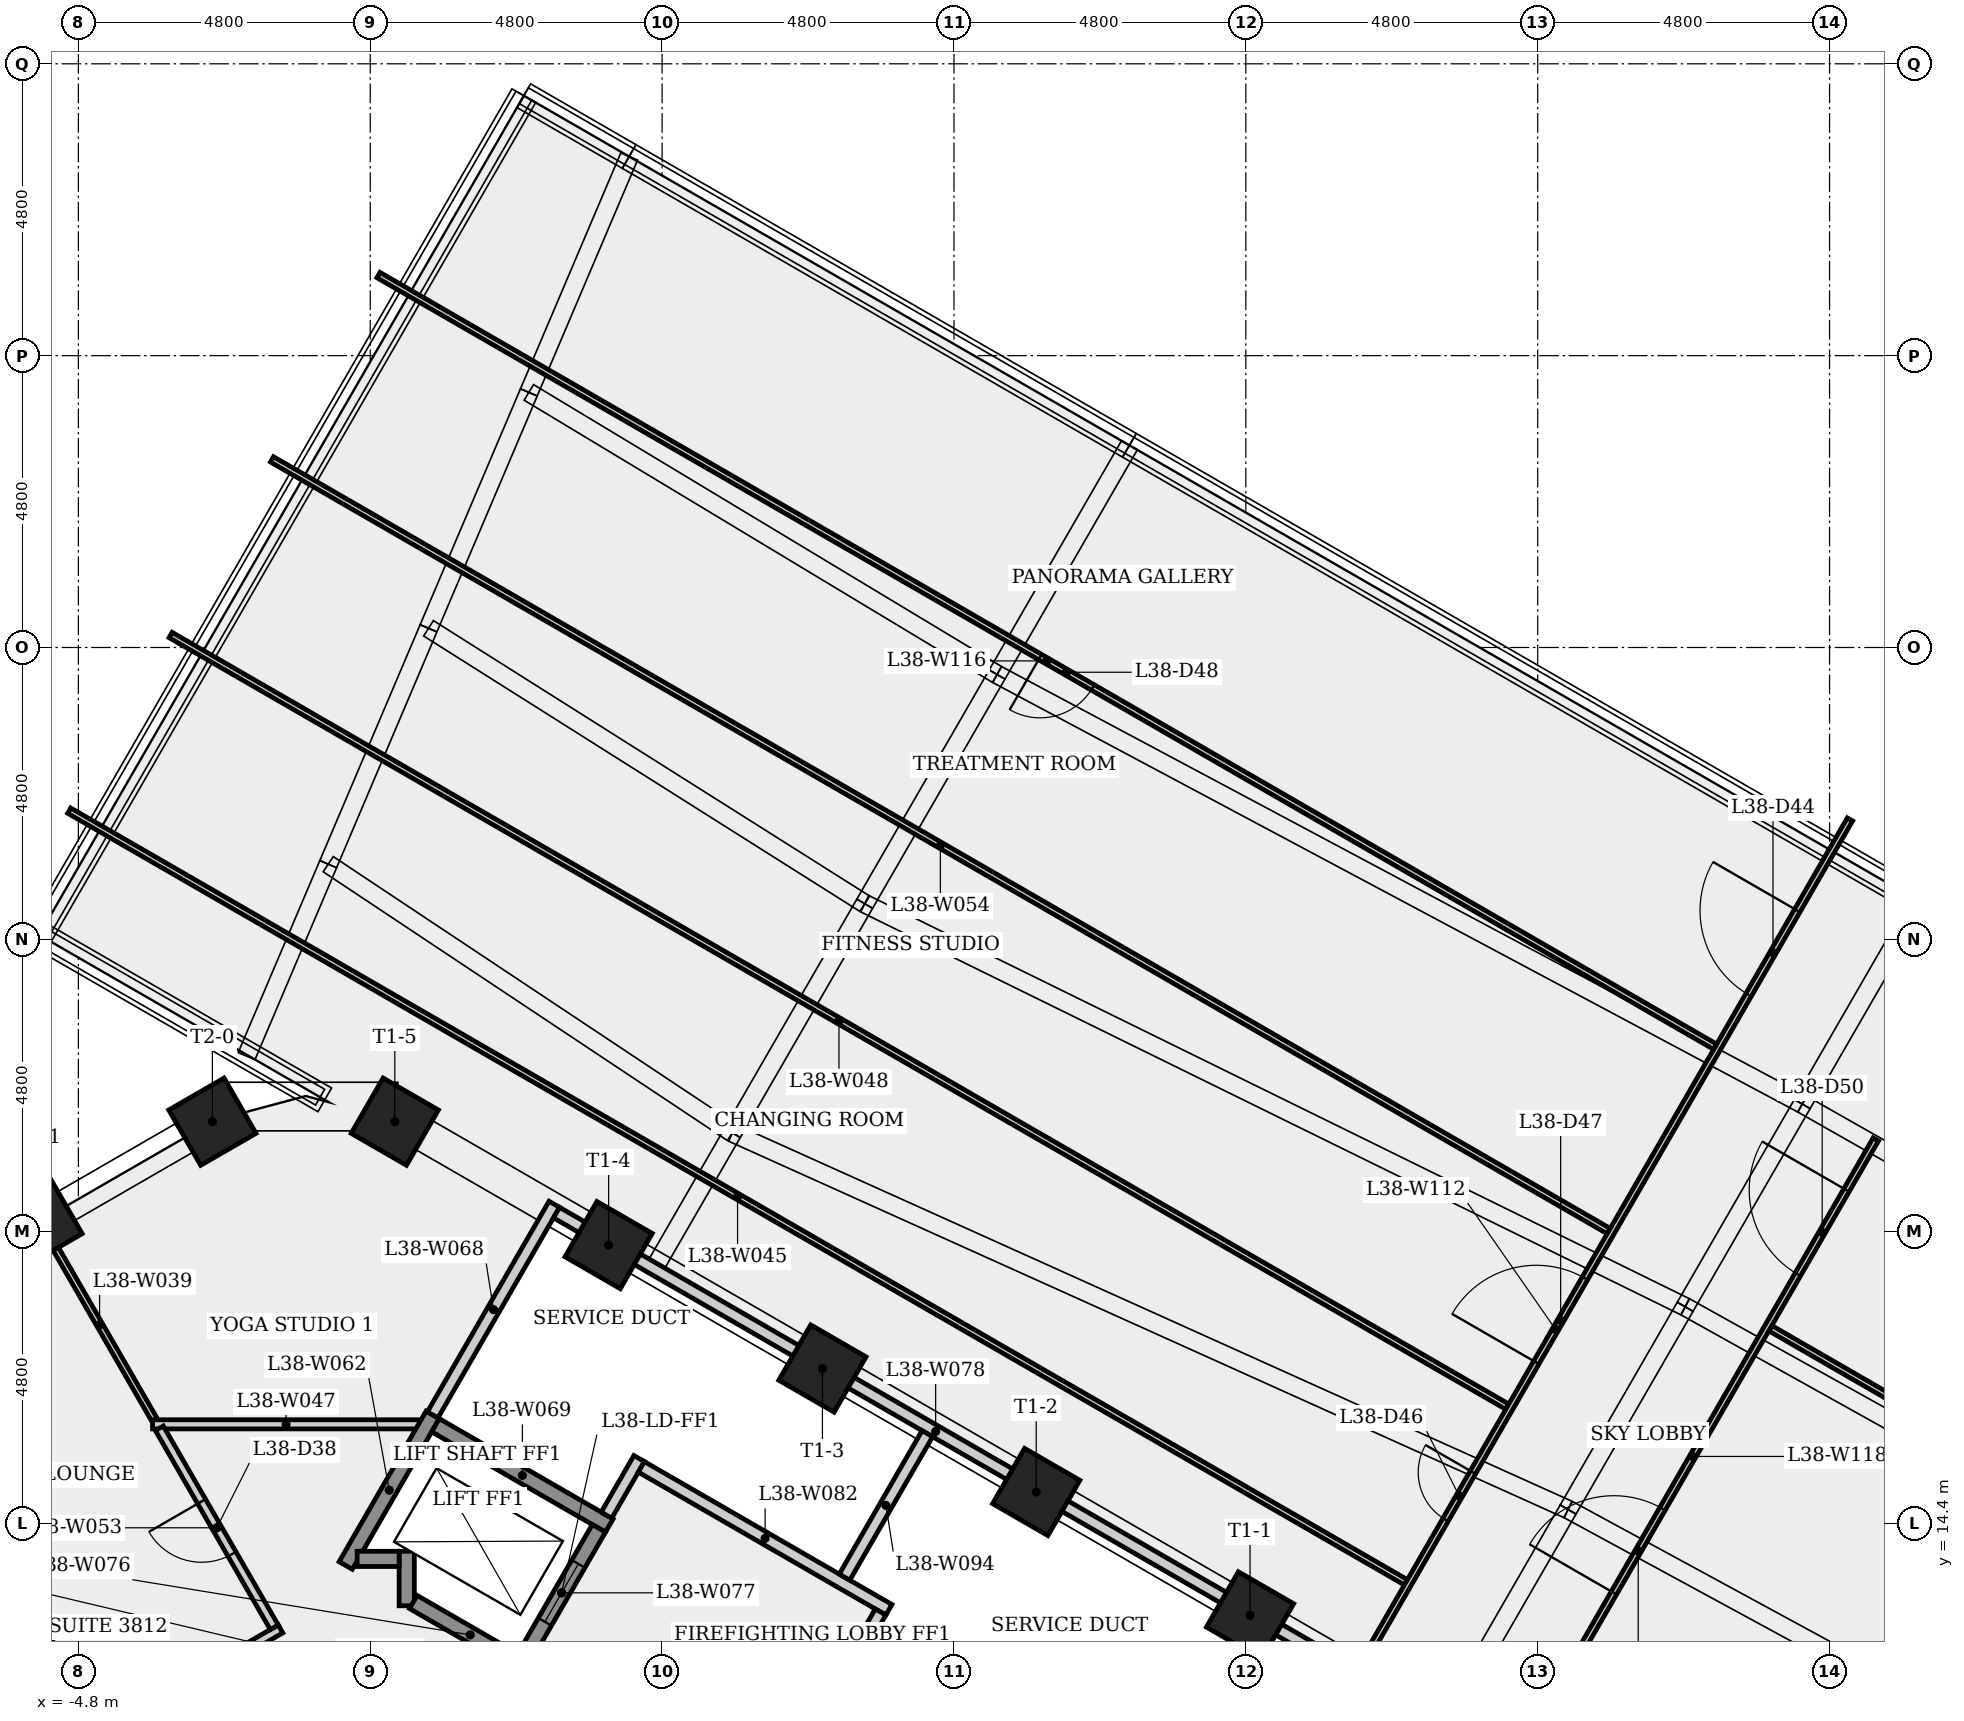
"""IFC4 building model, lengths in metres.
Left out: names, types, materials, properties, quantities, classifications, styles, units other than length and angle.
Written with IfcOpenShell. Run it as: python <this file> out.ifc"""

import sys

from ifc_helpers import new_model, si_unit, direction, frame, frame_2d, origin, origin_2d, place, context, subcontext, project, spatial, rectangle, extrude, element, fill, save


model = new_model("IFC4")
c1 = context("Model", 3, precision=1e-05, world=origin(), true_north=direction((0.0, 1.0)))
c2 = subcontext(c1, "Body", "Model", "MODEL_VIEW")
j1 = project(units=[si_unit("LENGTHUNIT", "METRE"), si_unit("PLANEANGLEUNIT", "RADIAN")], contexts=[c1])
p1 = place(None, origin())
s1 = spatial("IfcSite", under=j1, at=p1, CompositionType="ELEMENT")
p2 = place(p1, origin())
s2 = spatial("IfcBuilding", under=s1, at=p2, CompositionType="ELEMENT")
p3 = place(p2, frame((0.0, 0.0, 143.9)))
s3 = spatial("IfcBuildingStorey", under=s2, at=p3, CompositionType="ELEMENT", Elevation=143.9)
for number, where, z_axis, x_axis in (
    (1, (14.469, 12.88, 0.0), (0.0, 0.0, 1.0), (0.5, 0.866, 0.0)),
    (2, (10.953, 14.911, 0.0), (0.0, 0.0, 1.0), (0.5, 0.866, 0.0)),
    (3, (7.437, 16.941, 0.0), (0.0, 0.0, 1.0), (0.5, 0.866, 0.0)),
    (4, (3.92, 18.971, 0.0), (0.0, 0.0, 1.0), (0.5, 0.866, 0.0)),
    (5, (0.404, 21.001, 0.0), (0.0, 0.0, 1.0), (0.5, 0.866, 0.0)),
    (6, (-2.596, 21.001, 0.0), (0.0, 0.0, 1.0), (-0.5, 0.866, 0.0)),
    (7, (-5.455, 19.351, 0.0), (0.0, 0.0, 1.0), (-0.5, 0.866, 0.0)),
):
    element("IfcColumn", number, at=place(p3, frame(where, z_axis=z_axis, x_axis=x_axis)), inside=s3, PredefinedType="COLUMN", context=c2, shape_type="SweptSolid", body=[
        extrude(rectangle(XDim=1.05, YDim=1.05, at=origin_2d()), origin(), (0.0, 0.0, 1.0), 4.0),
    ])
p4 = place(p3, frame((-10.094, 7.682, 0.0), z_axis=(0.0, 0.0, 1.0), x_axis=(0.866024204941, 0.500002076452, 0.0)))
e8 = element("IfcWall", 8, at=p4, inside=s3, PredefinedType="PARTITIONING", context=c2, shape_type="SweptSolid", body=[
    extrude(rectangle(XDim=9.951, YDim=0.15, at=frame_2d((4.976, 0.0))), origin(), (0.0, 0.0, 1.0), 3.6),
])
p5 = place(p4, frame((3.642, 0.0, 0.0)))
e9 = element("IfcOpeningElement", 9, at=p5, cuts=e8, PredefinedType="OPENING", context=c2, shape_type="SweptSolid", body=[
    extrude(rectangle(XDim=0.9, YDim=2.1, at=frame_2d((0.45, 1.05))), frame((0.0, 0.085, 0.0), z_axis=(0.0, -1.0, 0.0), x_axis=(1.0, 0.0, 0.0)), (0.0, 0.0, 1.0), 0.17),
])
p6 = place(p3, frame((-5.359, 19.233, 0.0), z_axis=(0.0, 0.0, 1.0), x_axis=(0.499978511878, -0.866037809602, 0.0)))
e10 = element("IfcWall", 10, at=p6, inside=s3, PredefinedType="PARTITIONING", context=c2, shape_type="SweptSolid", body=[
    extrude(rectangle(XDim=3.632, YDim=0.1, at=frame_2d((1.816, 0.0))), origin(), (0.0, 0.0, 1.0), 3.6),
])
p7 = place(p3, frame((-4.451, 11.027, 0.0), z_axis=(0.0, 0.0, 1.0), x_axis=(-0.499983743644, 0.866034789193, 0.0)))
e11 = element("IfcWall", 11, at=p7, inside=s3, PredefinedType="PARTITIONING", context=c2, shape_type="SweptSolid", body=[
    extrude(rectangle(XDim=7.711, YDim=0.1, at=frame_2d((3.855, 0.0))), origin(), (0.0, 0.0, 1.0), 3.6),
])
p8 = place(p3, frame((-4.951, 26.117, 0.0), z_axis=(0.0, 0.0, 1.0), x_axis=(0.866023342268, -0.500003570635, 0.0)))
e12 = element("IfcWall", 12, at=p8, inside=s3, PredefinedType="PARTITIONING", context=c2, shape_type="SweptSolid", body=[
    extrude(rectangle(XDim=25.385, YDim=0.1, at=frame_2d((12.692, 0.0))), origin(), (0.0, 0.0, 1.0), 3.6),
])
p9 = place(p3, frame((-3.581, 16.023, 0.0), z_axis=(0.0, 0.0, 1.0), x_axis=(1.0, 0.0, 0.0)))
e13 = element("IfcWall", 13, at=p9, inside=s3, PredefinedType="PARTITIONING", context=c2, shape_type="SweptSolid", body=[
    extrude(rectangle(XDim=4.393, YDim=0.15, at=frame_2d((2.196, 0.0))), origin(), (0.0, 0.0, 1.0), 3.6),
])
p10 = place(p3, frame((-3.283, 29.005, 0.0), z_axis=(0.0, 0.0, 1.0), x_axis=(0.866023342268, -0.500003570635, 0.0)))
e14 = element("IfcWall", 14, at=p10, inside=s3, PredefinedType="PARTITIONING", context=c2, shape_type="SweptSolid", body=[
    extrude(rectangle(XDim=25.385, YDim=0.1, at=frame_2d((12.692, 0.0))), origin(), (0.0, 0.0, 1.0), 3.6),
])
p11 = place(p3, frame((-1.579, 12.685, 0.0), z_axis=(0.0, 0.0, 1.0), x_axis=(-0.500002049001, 0.86602422079, 0.0)))
e15 = element("IfcWall", 15, at=p11, inside=s3, PredefinedType="PARTITIONING", context=c2, shape_type="SweptSolid", body=[
    extrude(rectangle(XDim=3.779, YDim=0.15, at=frame_2d((1.89, 0.0))), origin(), (0.0, 0.0, 1.0), 3.6),
])
p12 = place(p11, frame((1.39, 0.0, 0.0)))
e16 = element("IfcOpeningElement", 16, at=p12, cuts=e15, PredefinedType="OPENING", context=c2, shape_type="SweptSolid", body=[
    extrude(rectangle(XDim=1.0, YDim=2.1, at=frame_2d((0.5, 1.05))), frame((0.0, 0.085, 0.0), z_axis=(0.0, -1.0, 0.0), x_axis=(1.0, 0.0, 0.0)), (0.0, 0.0, 1.0), 0.17),
])
p13 = place(p3, frame((-1.615, 31.894, 0.0), z_axis=(0.0, 0.0, 1.0), x_axis=(0.866023342268, -0.500003570635, 0.0)))
e17 = element("IfcWall", 17, at=p13, inside=s3, PredefinedType="PARTITIONING", context=c2, shape_type="SweptSolid", body=[
    extrude(rectangle(XDim=25.385, YDim=0.1, at=frame_2d((12.692, 0.0))), origin(), (0.0, 0.0, 1.0), 3.6),
])
p14 = place(p3, frame((-0.403, 13.702, 0.0), z_axis=(0.0, 0.0, 1.0), x_axis=(0.499976111731, 0.866039195244, 0.0)))
e18 = element("IfcWall", 18, at=p14, inside=s3, PredefinedType="SHEAR", context=c2, shape_type="SweptSolid", body=[
    extrude(rectangle(XDim=2.861, YDim=0.25, at=frame_2d((1.43, 0.0))), origin(), (0.0, 0.0, 1.0), 3.6),
])
p15 = place(p3, frame((0.6, 13.039, 0.0), z_axis=(0.0, 0.0, 1.0), x_axis=(0.0, 1.0, 0.0)))
e19 = element("IfcWall", 19, at=p15, inside=s3, PredefinedType="SHEAR", context=c2, shape_type="SweptSolid", body=[
    extrude(rectangle(XDim=0.896, YDim=0.25, at=frame_2d((0.448, 0.0))), origin(), (0.0, 0.0, 1.0), 3.6),
])
p16 = place(p3, frame((0.475, 13.81, 0.0), z_axis=(0.0, 0.0, 1.0), x_axis=(-1.0, 0.0, 0.0)))
e20 = element("IfcWall", 20, at=p16, inside=s3, PredefinedType="SHEAR", context=c2, shape_type="SweptSolid", body=[
    extrude(rectangle(XDim=0.691, YDim=0.25, at=frame_2d((0.345, 0.0))), origin(), (0.0, 0.0, 1.0), 4.0),
])
p17 = place(p3, frame((1.027, 16.179, 0.0), z_axis=(0.0, 0.0, 1.0), x_axis=(0.500006030964, 0.866021921778, 0.0)))
e21 = element("IfcWall", 21, at=p17, inside=s3, PredefinedType="PLUMBINGWALL", context=c2, shape_type="SweptSolid", body=[
    extrude(rectangle(XDim=4.0, YDim=0.2, at=frame_2d((2.0, 0.0))), origin(), (0.0, 0.0, 1.0), 3.6),
])
p18 = place(p3, frame((1.073, 16.008, 0.0), z_axis=(0.0, 0.0, 1.0), x_axis=(0.866040211805, -0.499974350878, 0.0)))
e22 = element("IfcWall", 22, at=p18, inside=s3, PredefinedType="SHEAR", context=c2, shape_type="SweptSolid", body=[
    extrude(rectangle(XDim=3.3, YDim=0.25, at=frame_2d((1.65, 0.0))), origin(), (0.0, 0.0, 1.0), 3.6),
])
p19 = place(p3, frame((2.581, 12.02, 0.0), z_axis=(0.0, 0.0, 1.0), x_axis=(-0.86603892542, 0.499976579108, 0.0)))
e23 = element("IfcWall", 23, at=p19, inside=s3, PredefinedType="SHEAR", context=c2, shape_type="SweptSolid", body=[
    extrude(rectangle(XDim=2.162, YDim=0.25, at=frame_2d((1.081, 0.0))), origin(), (0.0, 0.0, 1.0), 3.6),
])
p20 = place(p3, frame((2.535, 12.191, 0.0), z_axis=(0.0, 0.0, 1.0), x_axis=(0.500061746146, 0.865989751695, 0.0)))
e24 = element("IfcWall", 24, at=p20, inside=s3, PredefinedType="SHEAR", context=c2, shape_type="SweptSolid", body=[
    extrude(rectangle(XDim=2.45, YDim=0.25, at=frame_2d((1.225, 0.0))), origin(), (0.0, 0.0, 1.0), 4.0),
])
p21 = place(p20, frame((0.675, 0.0, 0.0)))
e25 = element("IfcOpeningElement", 25, at=p21, cuts=e24, PredefinedType="OPENING", context=c2, shape_type="SweptSolid", body=[
    extrude(rectangle(XDim=1.1, YDim=2.1, at=frame_2d((0.55, 1.05))), frame((0.0, 0.135, 0.0), z_axis=(0.0, -1.0, 0.0), x_axis=(1.0, 0.0, 0.0)), (0.0, 0.0, 1.0), 0.27),
])
p22 = place(p3, frame((3.063, 19.506, 0.0), z_axis=(0.0, 0.0, 1.0), x_axis=(0.866025783705, -0.499999341958, 0.0)))
e26 = element("IfcWall", 26, at=p22, inside=s3, PredefinedType="PLUMBINGWALL", context=c2, shape_type="SweptSolid", body=[
    extrude(rectangle(XDim=14.4, YDim=0.2, at=frame_2d((7.2, 0.0))), origin(), (0.0, 0.0, 1.0), 2.725),
])
p23 = place(p3, frame((3.885, 14.529, 0.0), z_axis=(0.0, 0.0, 1.0), x_axis=(0.499997628298, 0.866026773083, 0.0)))
e27 = element("IfcWall", 27, at=p23, inside=s3, PredefinedType="PLUMBINGWALL", context=c2, shape_type="SweptSolid", body=[
    extrude(rectangle(XDim=1.075, YDim=0.2, at=frame_2d((0.538, 0.0))), origin(), (0.0, 0.0, 1.0), 3.6),
])
p24 = place(p3, frame((4.459, 15.323, 0.0), z_axis=(0.0, 0.0, 1.0), x_axis=(0.866016039709, -0.500016218704, 0.0)))
e28 = element("IfcWall", 28, at=p24, inside=s3, PredefinedType="PLUMBINGWALL", context=c2, shape_type="SweptSolid", body=[
    extrude(rectangle(XDim=4.7, YDim=0.2, at=frame_2d((2.35, 0.0))), origin(), (0.0, 0.0, 1.0), 3.6),
])
p25 = place(p3, frame((6.48, 9.624, 0.0), z_axis=(0.0, 0.0, 1.0), x_axis=(0.500017246033, 0.866015446554, 0.0)))
e29 = element("IfcWall", 29, at=p25, inside=s3, PredefinedType="SHEAR", context=c2, shape_type="SweptSolid", body=[
    extrude(rectangle(XDim=3.25, YDim=0.25, at=frame_2d((1.625, 0.0))), origin(), (0.0, 0.0, 1.0), 3.6),
])
p26 = place(p25, frame((1.125, 0.0, 0.0)))
e30 = element("IfcOpeningElement", 30, at=p26, cuts=e29, PredefinedType="OPENING", context=c2, shape_type="SweptSolid", body=[
    extrude(rectangle(XDim=1.0, YDim=2.1, at=frame_2d((0.5, 1.05))), frame((0.0, 0.135, 0.0), z_axis=(0.0, -1.0, 0.0), x_axis=(1.0, 0.0, 0.0)), (0.0, 0.0, 1.0), 0.27),
])
p27 = place(p3, frame((7.8, 13.51, 0.0), z_axis=(0.0, 0.0, 1.0), x_axis=(0.499965519898, 0.866045309965, 0.0)))
e31 = element("IfcWall", 31, at=p27, inside=s3, PredefinedType="PLUMBINGWALL", context=c2, shape_type="SweptSolid", body=[
    extrude(rectangle(XDim=2.724, YDim=0.2, at=frame_2d((1.362, 0.0))), origin(), (0.0, 0.0, 1.0), 3.6),
])
p28 = place(p3, frame((8.393, 12.937, 0.0), z_axis=(0.0, 0.0, 1.0), x_axis=(-0.500065409566, -0.86598763626, 0.0)))
e32 = element("IfcWall", 32, at=p28, inside=s3, PredefinedType="PLUMBINGWALL", context=c2, shape_type="SweptSolid", body=[
    extrude(rectangle(XDim=0.575, YDim=0.2, at=frame_2d((0.288, 0.0))), origin(), (0.0, 0.0, 1.0), 3.6),
])
p29 = place(p3, frame((14.651, 9.2, 0.0), z_axis=(0.0, 0.0, 1.0), x_axis=(0.500009799479, 0.866019745978, 0.0)))
e33 = element("IfcWall", 33, at=p29, inside=s3, PredefinedType="PARTITIONING", context=c2, shape_type="SweptSolid", body=[
    extrude(rectangle(XDim=19.367, YDim=0.1, at=frame_2d((9.684, 0.0))), origin(), (0.0, 0.0, 1.0), 3.6),
])
p30 = place(p29, frame((16.036, 0.0, 0.0)))
e34 = element("IfcOpeningElement", 34, at=p30, cuts=e33, PredefinedType="OPENING", context=c2, shape_type="SweptSolid", body=[
    extrude(rectangle(XDim=1.6, YDim=2.1, at=frame_2d((0.8, 1.05))), frame((0.0, 0.06, 0.0), z_axis=(0.0, -1.0, 0.0), x_axis=(1.0, 0.0, 0.0)), (0.0, 0.0, 1.0), 0.12),
])
p31 = place(p29, frame((1.61, 0.0, 0.0)))
e35 = element("IfcOpeningElement", 35, at=p31, cuts=e33, PredefinedType="OPENING", context=c2, shape_type="SweptSolid", body=[
    extrude(rectangle(XDim=1.6, YDim=2.1, at=frame_2d((0.8, 1.05))), frame((0.0, 0.06, 0.0), z_axis=(0.0, -1.0, 0.0), x_axis=(1.0, 0.0, 0.0)), (0.0, 0.0, 1.0), 0.12),
])
p32 = place(p29, frame((6.067, 0.0, 0.0)))
e36 = element("IfcOpeningElement", 36, at=p32, cuts=e33, PredefinedType="OPENING", context=c2, shape_type="SweptSolid", body=[
    extrude(rectangle(XDim=0.9, YDim=2.1, at=frame_2d((0.45, 1.05))), frame((0.0, 0.06, 0.0), z_axis=(0.0, -1.0, 0.0), x_axis=(1.0, 0.0, 0.0)), (0.0, 0.0, 1.0), 0.12),
])
p33 = place(p29, frame((9.053, 0.0, 0.0)))
e37 = element("IfcOpeningElement", 37, at=p33, cuts=e33, PredefinedType="OPENING", context=c2, shape_type="SweptSolid", body=[
    extrude(rectangle(XDim=1.6, YDim=2.1, at=frame_2d((0.8, 1.05))), frame((0.0, 0.06, 0.0), z_axis=(0.0, -1.0, 0.0), x_axis=(1.0, 0.0, 0.0)), (0.0, 0.0, 1.0), 0.12),
])
p34 = place(p3, frame((22.119, 22.233, 0.0), z_axis=(0.0, 0.0, 1.0), x_axis=(-0.866027506852, 0.499996357363, 0.0)))
e38 = element("IfcWall", 38, at=p34, inside=s3, PredefinedType="PARTITIONING", context=c2, shape_type="SweptSolid", body=[
    extrude(rectangle(XDim=25.385, YDim=0.1, at=frame_2d((12.692, 0.0))), origin(), (0.0, 0.0, 1.0), 3.275),
])
p35 = place(p34, frame((11.819, 0.0, 0.0)))
e39 = element("IfcOpeningElement", 39, at=p35, cuts=e38, PredefinedType="OPENING", context=c2, shape_type="SweptSolid", body=[
    extrude(rectangle(XDim=1.0, YDim=2.1, at=frame_2d((0.5, 1.05))), frame((0.0, 0.06, 0.0), z_axis=(0.0, -1.0, 0.0), x_axis=(1.0, 0.0, 0.0)), (0.0, 0.0, 1.0), 0.12),
])
p36 = place(p3, frame((23.025, 17.604, 0.0), z_axis=(0.0, 0.0, 1.0), x_axis=(0.866024593443, -0.500001403549, 0.0)))
e40 = element("IfcWall", 40, at=p36, inside=s3, PredefinedType="PARTITIONING", context=c2, shape_type="SweptSolid", body=[
    extrude(rectangle(XDim=10.708, YDim=0.1, at=frame_2d((5.354, 0.0))), origin(), (0.0, 0.0, 1.0), 3.6),
])
p37 = place(p3, frame((18.74, 10.282, 0.0), z_axis=(0.0, 0.0, 1.0), x_axis=(0.50000797982, 0.866020796584, 0.0)))
e41 = element("IfcWall", 41, at=p37, inside=s3, PredefinedType="PARTITIONING", context=c2, shape_type="SweptSolid", body=[
    extrude(rectangle(XDim=12.04, YDim=0.1, at=frame_2d((6.02, 0.0))), origin(), (0.0, 0.0, 1.0), 3.6),
])
p38 = place(p37, frame((3.427, 0.0, 0.0)))
e42 = element("IfcOpeningElement", 42, at=p38, cuts=e41, PredefinedType="OPENING", context=c2, shape_type="SweptSolid", body=[
    extrude(rectangle(XDim=1.6, YDim=2.1, at=frame_2d((0.8, 1.05))), frame((0.0, 0.06, 0.0), z_axis=(0.0, -1.0, 0.0), x_axis=(1.0, 0.0, 0.0)), (0.0, 0.0, 1.0), 0.12),
])
p39 = place(p37, frame((9.477, 0.0, 0.0)))
e43 = element("IfcOpeningElement", 43, at=p39, cuts=e41, PredefinedType="OPENING", context=c2, shape_type="SweptSolid", body=[
    extrude(rectangle(XDim=1.6, YDim=2.1, at=frame_2d((0.8, 1.05))), frame((0.0, 0.06, 0.0), z_axis=(0.0, -1.0, 0.0), x_axis=(1.0, 0.0, 0.0)), (0.0, 0.0, 1.0), 0.12),
])
p40 = place(p21, origin())
e44 = element("IfcDoor", 44, at=p40, inside=s3, OperationType="SLIDING_TO_LEFT", PredefinedType="DOOR", context=c2, shape_type="SweptSolid", body=[
    extrude(rectangle(XDim=1.1, YDim=2.1, at=frame_2d((0.55, 1.05))), frame((0.0, 0.025, 0.0), z_axis=(0.0, -1.0, 0.0), x_axis=(1.0, 0.0, 0.0)), (0.0, 0.0, 1.0), 0.05),
])
fill(e25, e44)
p41 = place(p12, origin())
e45 = element("IfcDoor", 45, at=p41, inside=s3, OperationType="SINGLE_SWING_RIGHT", PredefinedType="DOOR", context=c2, shape_type="SweptSolid", body=[
    extrude(rectangle(XDim=1.0, YDim=2.1, at=frame_2d((0.5, 1.05))), frame((0.0, 0.025, 0.0), z_axis=(0.0, -1.0, 0.0), x_axis=(1.0, 0.0, 0.0)), (0.0, 0.0, 1.0), 0.05),
])
fill(e16, e45)
p42 = place(p30, origin())
e46 = element("IfcDoor", 46, at=p42, inside=s3, OperationType="SINGLE_SWING_RIGHT", PredefinedType="DOOR", context=c2, shape_type="SweptSolid", body=[
    extrude(rectangle(XDim=1.6, YDim=2.1, at=frame_2d((0.8, 1.05))), frame((0.0, 0.025, 0.0), z_axis=(0.0, -1.0, 0.0), x_axis=(1.0, 0.0, 0.0)), (0.0, 0.0, 1.0), 0.05),
])
fill(e34, e46)
p43 = place(p32, origin())
e47 = element("IfcDoor", 47, at=p43, inside=s3, OperationType="SINGLE_SWING_RIGHT", PredefinedType="DOOR", context=c2, shape_type="SweptSolid", body=[
    extrude(rectangle(XDim=0.9, YDim=2.1, at=frame_2d((0.45, 1.05))), frame((0.0, 0.025, 0.0), z_axis=(0.0, -1.0, 0.0), x_axis=(1.0, 0.0, 0.0)), (0.0, 0.0, 1.0), 0.05),
])
fill(e36, e47)
p44 = place(p33, origin())
e48 = element("IfcDoor", 48, at=p44, inside=s3, OperationType="SINGLE_SWING_LEFT", PredefinedType="DOOR", context=c2, shape_type="SweptSolid", body=[
    extrude(rectangle(XDim=1.6, YDim=2.1, at=frame_2d((0.8, 1.05))), frame((0.0, 0.025, 0.0), z_axis=(0.0, -1.0, 0.0), x_axis=(1.0, 0.0, 0.0)), (0.0, 0.0, 1.0), 0.05),
])
fill(e37, e48)
p45 = place(p35, origin())
e49 = element("IfcDoor", 49, at=p45, inside=s3, OperationType="SINGLE_SWING_RIGHT", PredefinedType="DOOR", context=c2, shape_type="SweptSolid", body=[
    extrude(rectangle(XDim=1.0, YDim=2.1, at=frame_2d((0.5, 1.05))), frame((0.0, 0.025, 0.0), z_axis=(0.0, -1.0, 0.0), x_axis=(1.0, 0.0, 0.0)), (0.0, 0.0, 1.0), 0.05),
])
fill(e39, e49)
p46 = place(p38, origin())
e50 = element("IfcDoor", 50, at=p46, inside=s3, OperationType="SINGLE_SWING_LEFT", PredefinedType="DOOR", context=c2, shape_type="SweptSolid", body=[
    extrude(rectangle(XDim=1.6, YDim=2.1, at=frame_2d((0.8, 1.05))), frame((0.0, 0.025, 0.0), z_axis=(0.0, -1.0, 0.0), x_axis=(1.0, 0.0, 0.0)), (0.0, 0.0, 1.0), 0.05),
])
fill(e42, e50)
p47 = place(p39, origin())
e51 = element("IfcDoor", 51, at=p47, inside=s3, OperationType="SINGLE_SWING_RIGHT", PredefinedType="DOOR", context=c2, shape_type="SweptSolid", body=[
    extrude(rectangle(XDim=1.6, YDim=2.1, at=frame_2d((0.8, 1.05))), frame((0.0, 0.025, 0.0), z_axis=(0.0, -1.0, 0.0), x_axis=(1.0, 0.0, 0.0)), (0.0, 0.0, 1.0), 0.05),
])
fill(e43, e51)
save(model, sys.argv[1])
